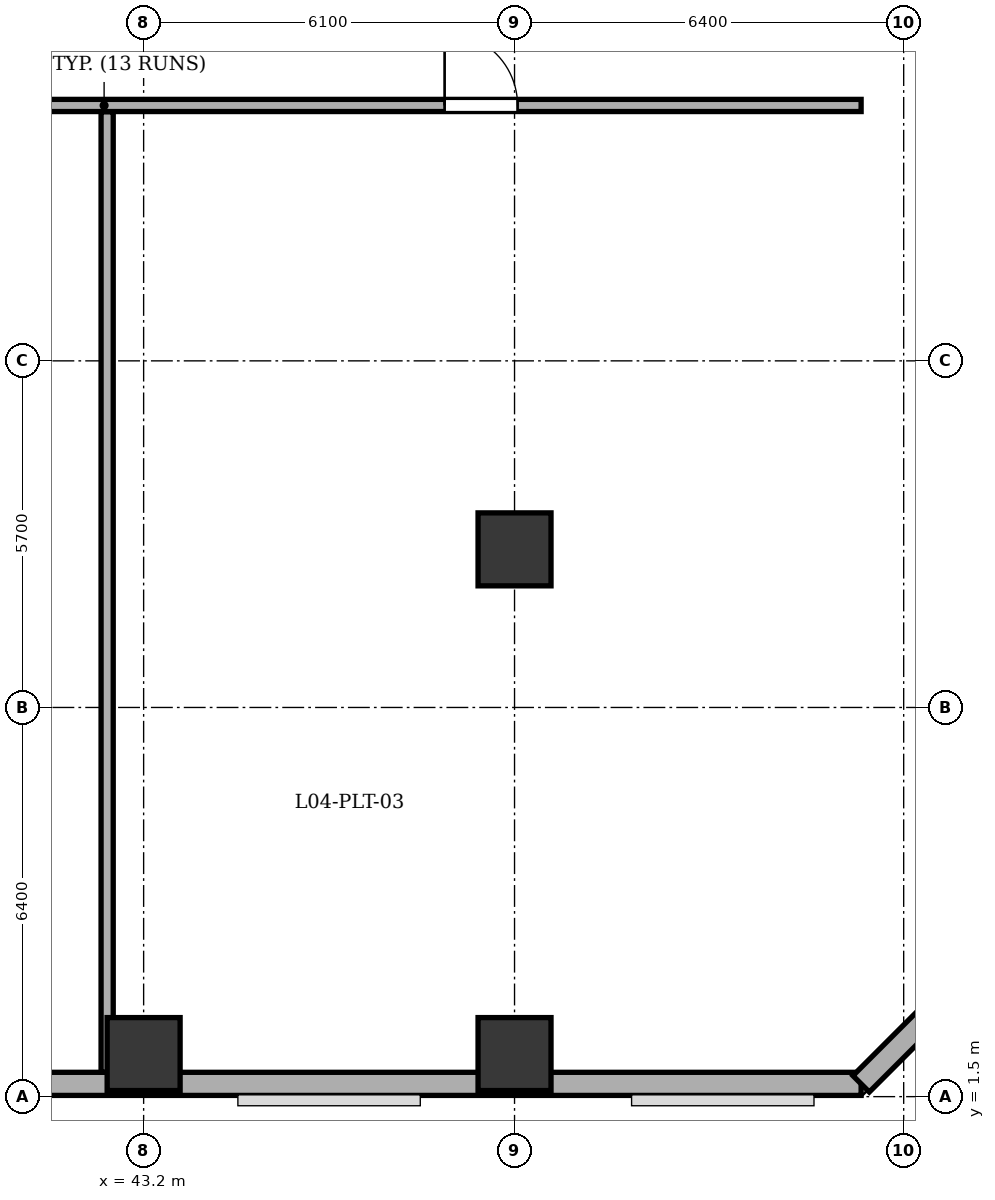
"""IFC4 building model, lengths in metres.
Left out: names, types, materials, properties, quantities, classifications, styles, units other than length and angle.
Written with IfcOpenShell. Run it as: python <this file> out.ifc"""

import sys

from ifc_helpers import new_model, si_unit, direction, frame, frame_2d, origin, origin_2d, place, context, subcontext, project, spatial, rectangle, extrude, element, fill, save


model = new_model("IFC4")
c1 = context("Model", 3, precision=1e-05, world=origin(), true_north=direction((0.0, 1.0)))
c2 = subcontext(c1, "Body", "Model", "MODEL_VIEW")
j1 = project(units=[si_unit("LENGTHUNIT", "METRE"), si_unit("PLANEANGLEUNIT", "RADIAN")], contexts=[c1])
p1 = place(None, origin())
s1 = spatial("IfcSite", under=j1, at=p1, CompositionType="ELEMENT")
p2 = place(p1, origin())
s2 = spatial("IfcBuilding", under=s1, at=p2, CompositionType="ELEMENT")
p3 = place(p2, frame((0.0, 0.0, 18.9)))
s3 = spatial("IfcBuildingStorey", under=s2, at=p3, CompositionType="ELEMENT", Elevation=18.9)
for number, where, z_axis, x_axis in (
    (1, (43.2, 2.2, 0.0), (0.0, 0.0, 1.0), (1.0, 0.0, 0.0)),
    (2, (49.3, 2.2, 0.0), (0.0, 0.0, 1.0), (1.0, 0.0, 0.0)),
    (3, (49.3, 10.5, 0.0), (0.0, 0.0, 1.0), (1.0, 0.0, 0.0)),
):
    element("IfcColumn", number, at=place(p3, frame(where, z_axis=z_axis, x_axis=x_axis)), inside=s3, PredefinedType="COLUMN", context=c2, shape_type="SweptSolid", body=[
        extrude(rectangle(XDim=1.2, YDim=1.2, at=origin_2d()), origin(), (0.0, 0.0, 1.0), 5.4),
    ])
p4 = place(p3, frame((55.0, 1.71, 0.0), z_axis=(0.0, 0.0, 1.0), x_axis=(-1.0, 0.0, 0.0)))
e4 = element("IfcWall", 4, at=p4, inside=s3, PredefinedType="STANDARD", context=c2, shape_type="SweptSolid", body=[
    extrude(rectangle(XDim=49.6, YDim=0.38, at=frame_2d((24.8, 0.0))), origin(), (0.0, 0.0, 1.0), 4.95),
])
p5 = place(p3, frame((57.79, 4.5, 0.0), z_axis=(0.0, 0.0, 1.0), x_axis=(-0.707106781187, -0.707106781187, 0.0)))
e5 = element("IfcWall", 5, at=p5, inside=s3, PredefinedType="STANDARD", context=c2, shape_type="SweptSolid", body=[
    extrude(rectangle(XDim=3.946, YDim=0.38, at=frame_2d((1.973, 0.0))), origin(), (0.0, 0.0, 1.0), 4.95),
])
p6 = place(p3, frame((5.4, 17.8, 0.0), z_axis=(0.0, 0.0, 1.0), x_axis=(1.0, 0.0, 0.0)))
e6 = element("IfcWall", 6, at=p6, inside=s3, PredefinedType="SOLIDWALL", context=c2, shape_type="SweptSolid", body=[
    extrude(rectangle(XDim=49.6, YDim=0.2, at=frame_2d((24.8, 0.0))), origin(), (0.0, 0.0, 1.0), 4.95),
])
p7 = place(p6, frame((5.55, 0.0, 0.0)))
e7 = element("IfcOpeningElement", 7, at=p7, cuts=e6, PredefinedType="OPENING", context=c2, shape_type="SweptSolid", body=[
    extrude(rectangle(XDim=1.2, YDim=2.15, at=frame_2d((0.6, 1.075))), frame((0.0, 0.11, 0.0), z_axis=(0.0, -1.0, 0.0), x_axis=(1.0, 0.0, 0.0)), (0.0, 0.0, 1.0), 0.22),
])
p8 = place(p6, frame((15.25, 0.0, 0.0)))
e8 = element("IfcOpeningElement", 8, at=p8, cuts=e6, PredefinedType="OPENING", context=c2, shape_type="SweptSolid", body=[
    extrude(rectangle(XDim=1.2, YDim=2.15, at=frame_2d((0.6, 1.075))), frame((0.0, 0.11, 0.0), z_axis=(0.0, -1.0, 0.0), x_axis=(1.0, 0.0, 0.0)), (0.0, 0.0, 1.0), 0.22),
])
p9 = place(p6, frame((30.35, 0.0, 0.0)))
e9 = element("IfcOpeningElement", 9, at=p9, cuts=e6, PredefinedType="OPENING", context=c2, shape_type="SweptSolid", body=[
    extrude(rectangle(XDim=1.2, YDim=2.15, at=frame_2d((0.6, 1.075))), frame((0.0, 0.11, 0.0), z_axis=(0.0, -1.0, 0.0), x_axis=(1.0, 0.0, 0.0)), (0.0, 0.0, 1.0), 0.22),
])
p10 = place(p6, frame((42.75, 0.0, 0.0)))
e10 = element("IfcOpeningElement", 10, at=p10, cuts=e6, PredefinedType="OPENING", context=c2, shape_type="SweptSolid", body=[
    extrude(rectangle(XDim=1.2, YDim=2.15, at=frame_2d((0.6, 1.075))), frame((0.0, 0.11, 0.0), z_axis=(0.0, -1.0, 0.0), x_axis=(1.0, 0.0, 0.0)), (0.0, 0.0, 1.0), 0.22),
])
p11 = place(p6, frame((25.0, 0.0, 0.0)))
e11 = element("IfcOpeningElement", 11, at=p11, cuts=e6, PredefinedType="OPENING", context=c2, shape_type="SweptSolid", body=[
    extrude(rectangle(XDim=1.2, YDim=2.15, at=frame_2d((0.6, 1.075))), frame((0.0, 0.11, 0.0), z_axis=(0.0, -1.0, 0.0), x_axis=(1.0, 0.0, 0.0)), (0.0, 0.0, 1.0), 0.22),
])
p12 = place(p3, frame((42.6, 1.905, 0.0), z_axis=(0.0, 0.0, 1.0), x_axis=(0.0, 1.0, 0.0)))
e12 = element("IfcWall", 12, at=p12, inside=s3, PredefinedType="SOLIDWALL", context=c2, shape_type="SweptSolid", body=[
    extrude(rectangle(XDim=15.79, YDim=0.2, at=frame_2d((7.895, 0.0))), origin(), (0.0, 0.0, 1.0), 4.95),
])
p13 = place(p10, origin())
e13 = element("IfcDoor", 13, at=p13, inside=s3, OperationType="SINGLE_SWING_LEFT", PredefinedType="DOOR", context=c2, shape_type="SweptSolid", body=[
    extrude(rectangle(XDim=1.2, YDim=2.15, at=frame_2d((0.6, 1.075))), frame((0.0, 0.025, 0.0), z_axis=(0.0, -1.0, 0.0), x_axis=(1.0, 0.0, 0.0)), (0.0, 0.0, 1.0), 0.05),
])
fill(e10, e13)
save(model, sys.argv[1])
